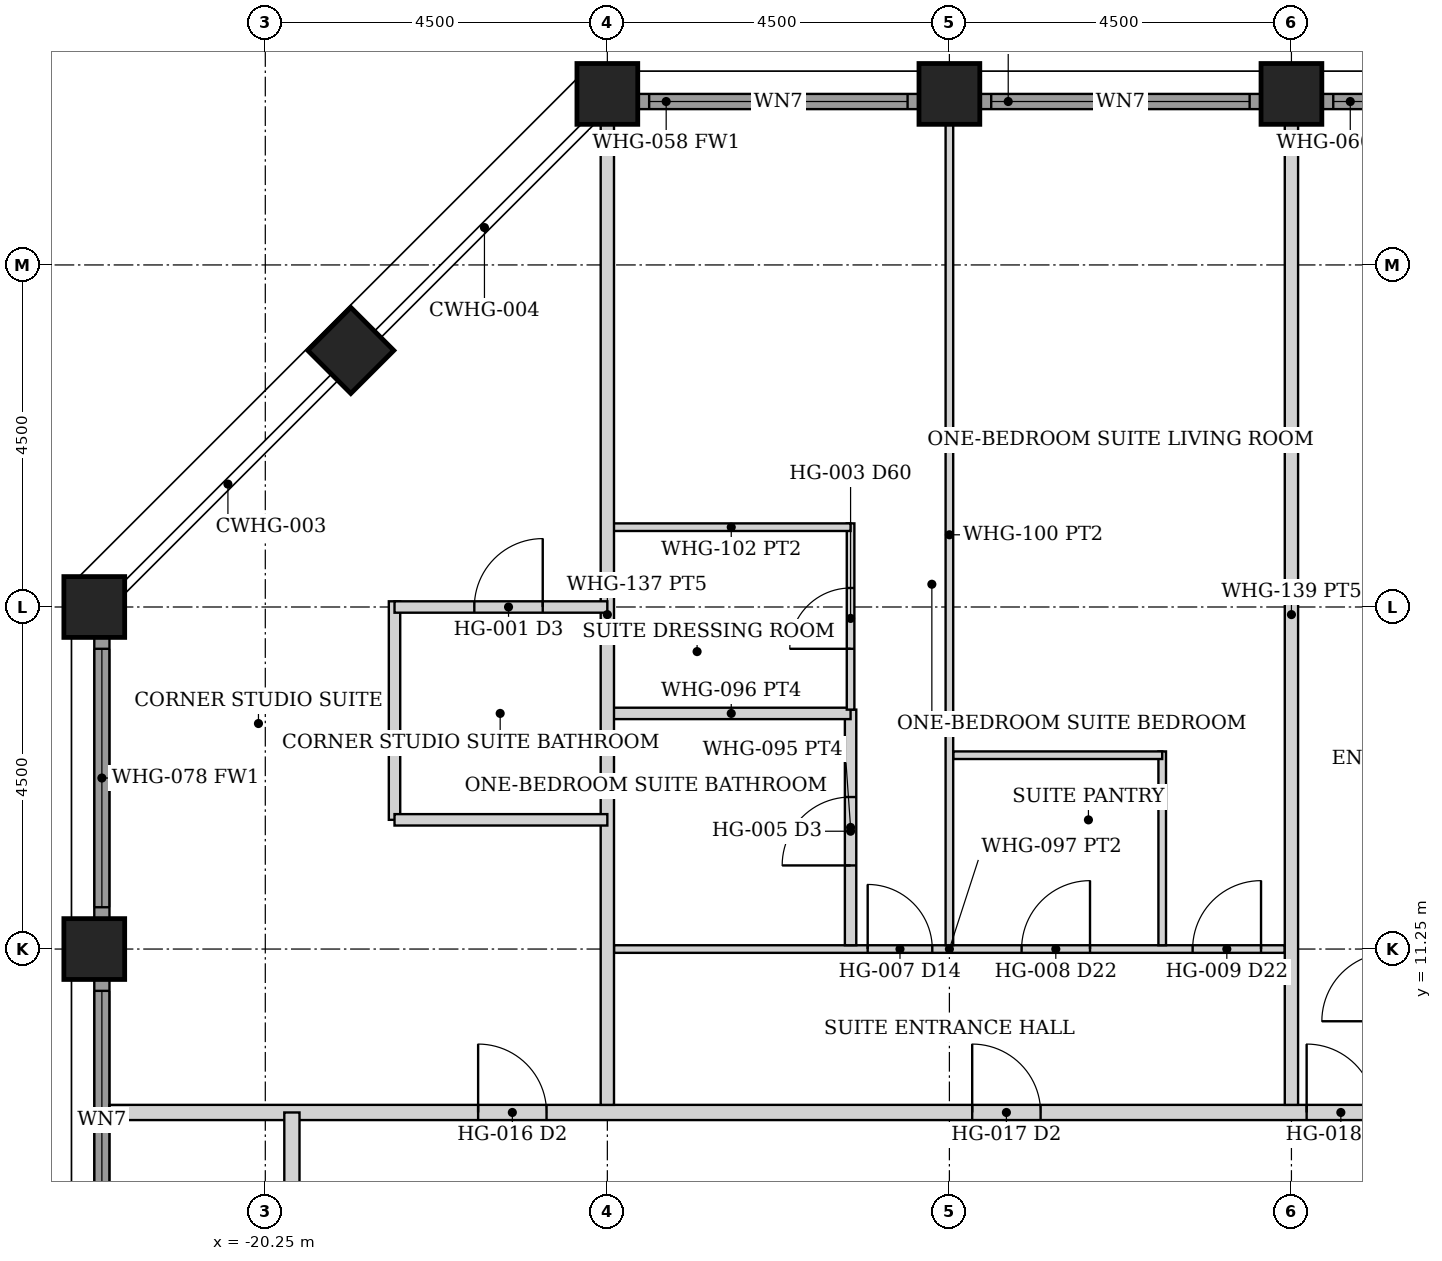
"""IFC4 building model, lengths in metres.
Left out: names, types, materials, properties, quantities, classifications, styles, units other than length and angle.
Written with IfcOpenShell. Run it as: python <this file> out.ifc"""

import sys

from ifc_helpers import new_model, si_unit, direction, frame, frame_2d, origin, origin_2d, place, context, subcontext, project, spatial, rectangle, hollow_rectangle, extrude, element, fill, save


model = new_model("IFC4")
c1 = context("Model", 3, precision=1e-05, world=origin(), true_north=direction((0.0, 1.0)))
c2 = subcontext(c1, "Body", "Model", "MODEL_VIEW")
j1 = project(units=[si_unit("LENGTHUNIT", "METRE"), si_unit("PLANEANGLEUNIT", "RADIAN")], contexts=[c1])
p1 = place(None, origin())
s1 = spatial("IfcSite", under=j1, at=p1, CompositionType="ELEMENT")
p2 = place(p1, origin())
s2 = spatial("IfcBuilding", under=s1, at=p2, CompositionType="ELEMENT")
p3 = place(p2, frame((0.0, 0.0, 186.8)))
s3 = spatial("IfcBuildingStorey", under=s2, at=p3, CompositionType="ELEMENT", Elevation=186.8)
for number, where, z_axis, x_axis in (
    (1, (-15.75, 22.5, 0.0), (0.0, 0.0, 1.0), (0.0, 1.0, 0.0)),
    (2, (-11.25, 22.5, 0.0), (0.0, 0.0, 1.0), (0.0, 1.0, 0.0)),
    (3, (-6.75, 22.5, 0.0), (0.0, 0.0, 1.0), (0.0, 1.0, 0.0)),
    (4, (-22.5, 11.25, 0.0), (0.0, 0.0, 1.0), (1.0, 0.0, 0.0)),
    (5, (-22.5, 15.75, 0.0), (0.0, 0.0, 1.0), (1.0, 0.0, 0.0)),
    (6, (-19.125, 19.125, 0.0), (0.0, 0.0, 1.0), (0.707, -0.707, 0.0)),
):
    element("IfcColumn", number, at=place(p3, frame(where, z_axis=z_axis, x_axis=x_axis)), inside=s3, PredefinedType="COLUMN", context=c2, shape_type="SweptSolid", body=[
        extrude(hollow_rectangle(XDim=0.8, YDim=0.8, WallThickness=0.045, at=origin_2d()), origin(), (0.0, 0.0, 1.0), 3.6),
    ])
p4 = place(p3, frame((-15.345, 22.4, 0.0), z_axis=(0.0, 0.0, 1.0), x_axis=(1.0, 0.0, 0.0)))
e7 = element("IfcWall", 7, at=p4, inside=s3, PredefinedType="SOLIDWALL", context=c2, shape_type="SweptSolid", body=[
    extrude(rectangle(XDim=3.69, YDim=0.2, at=frame_2d((1.845, 0.0))), origin(), (0.0, 0.0, 1.0), 2.379),
])
p5 = place(p4, frame((0.145, 0.0, 0.3)))
e8 = element("IfcOpeningElement", 8, at=p5, cuts=e7, PredefinedType="OPENING", context=c2, shape_type="SweptSolid", body=[
    extrude(rectangle(XDim=3.4, YDim=1.929, at=frame_2d((1.7, 0.964))), frame((0.0, 0.11, 0.0), z_axis=(0.0, -1.0, 0.0), x_axis=(1.0, 0.0, 0.0)), (0.0, 0.0, 1.0), 0.22),
])
p6 = place(p3, frame((-10.845, 22.4, 0.0), z_axis=(0.0, 0.0, 1.0), x_axis=(1.0, 0.0, 0.0)))
e9 = element("IfcWall", 9, at=p6, inside=s3, PredefinedType="SOLIDWALL", context=c2, shape_type="SweptSolid", body=[
    extrude(rectangle(XDim=3.69, YDim=0.2, at=frame_2d((1.845, 0.0))), origin(), (0.0, 0.0, 1.0), 2.379),
])
p7 = place(p6, frame((0.145, 0.0, 0.3)))
e10 = element("IfcOpeningElement", 10, at=p7, cuts=e9, PredefinedType="OPENING", context=c2, shape_type="SweptSolid", body=[
    extrude(rectangle(XDim=3.4, YDim=1.929, at=frame_2d((1.7, 0.964))), frame((0.0, 0.11, 0.0), z_axis=(0.0, -1.0, 0.0), x_axis=(1.0, 0.0, 0.0)), (0.0, 0.0, 1.0), 0.22),
])
p8 = place(p3, frame((-6.345, 22.4, 0.0), z_axis=(0.0, 0.0, 1.0), x_axis=(1.0, 0.0, 0.0)))
e11 = element("IfcWall", 11, at=p8, inside=s3, PredefinedType="SOLIDWALL", context=c2, shape_type="SweptSolid", body=[
    extrude(rectangle(XDim=3.69, YDim=0.2, at=frame_2d((1.845, 0.0))), origin(), (0.0, 0.0, 1.0), 2.379),
])
p9 = place(p8, frame((0.145, 0.0, 0.3)))
e12 = element("IfcOpeningElement", 12, at=p9, cuts=e11, PredefinedType="OPENING", context=c2, shape_type="SweptSolid", body=[
    extrude(rectangle(XDim=3.4, YDim=1.929, at=frame_2d((1.7, 0.964))), frame((0.0, 0.11, 0.0), z_axis=(0.0, -1.0, 0.0), x_axis=(1.0, 0.0, 0.0)), (0.0, 0.0, 1.0), 0.22),
])
p10 = place(p3, frame((-22.4, 7.155, 0.0), z_axis=(0.0, 0.0, 1.0), x_axis=(0.0, 1.0, 0.0)))
e13 = element("IfcWall", 13, at=p10, inside=s3, PredefinedType="SOLIDWALL", context=c2, shape_type="SweptSolid", body=[
    extrude(rectangle(XDim=3.69, YDim=0.2, at=frame_2d((1.845, 0.0))), origin(), (0.0, 0.0, 1.0), 2.379),
])
p11 = place(p10, frame((0.145, 0.0, 0.3)))
e14 = element("IfcOpeningElement", 14, at=p11, cuts=e13, PredefinedType="OPENING", context=c2, shape_type="SweptSolid", body=[
    extrude(rectangle(XDim=3.4, YDim=1.929, at=frame_2d((1.7, 0.964))), frame((0.0, 0.11, 0.0), z_axis=(0.0, -1.0, 0.0), x_axis=(1.0, 0.0, 0.0)), (0.0, 0.0, 1.0), 0.22),
])
p12 = place(p3, frame((-22.4, 11.655, 0.0), z_axis=(0.0, 0.0, 1.0), x_axis=(0.0, 1.0, 0.0)))
e15 = element("IfcWall", 15, at=p12, inside=s3, PredefinedType="SOLIDWALL", context=c2, shape_type="SweptSolid", body=[
    extrude(rectangle(XDim=3.69, YDim=0.2, at=frame_2d((1.845, 0.0))), origin(), (0.0, 0.0, 1.0), 2.379),
])
p13 = place(p12, frame((0.145, 0.0, 0.3)))
e16 = element("IfcOpeningElement", 16, at=p13, cuts=e15, PredefinedType="OPENING", context=c2, shape_type="SweptSolid", body=[
    extrude(rectangle(XDim=3.4, YDim=1.929, at=frame_2d((1.7, 0.964))), frame((0.0, 0.11, 0.0), z_axis=(0.0, -1.0, 0.0), x_axis=(1.0, 0.0, 0.0)), (0.0, 0.0, 1.0), 0.22),
])
p14 = place(p3, frame((-22.3, 9.1, 0.0), z_axis=(0.0, 0.0, 1.0), x_axis=(1.0, 0.0, 0.0)))
e17 = element("IfcWall", 17, at=p14, inside=s3, PredefinedType="PARTITIONING", context=c2, shape_type="SweptSolid", body=[
    extrude(rectangle(XDim=44.6, YDim=0.2, at=frame_2d((22.3, 0.0))), origin(), (0.0, 0.0, 1.0), 2.379),
])
p15 = place(p14, frame((11.35, 0.0, 0.0)))
e18 = element("IfcOpeningElement", 18, at=p15, cuts=e17, PredefinedType="OPENING", context=c2, shape_type="SweptSolid", body=[
    extrude(rectangle(XDim=0.9, YDim=2.1, at=frame_2d((0.45, 1.05))), frame((0.0, 0.11, 0.0), z_axis=(0.0, -1.0, 0.0), x_axis=(1.0, 0.0, 0.0)), (0.0, 0.0, 1.0), 0.22),
])
p16 = place(p14, frame((15.75, 0.0, 0.0)))
e19 = element("IfcOpeningElement", 19, at=p16, cuts=e17, PredefinedType="OPENING", context=c2, shape_type="SweptSolid", body=[
    extrude(rectangle(XDim=0.9, YDim=2.1, at=frame_2d((0.45, 1.05))), frame((0.0, 0.11, 0.0), z_axis=(0.0, -1.0, 0.0), x_axis=(1.0, 0.0, 0.0)), (0.0, 0.0, 1.0), 0.22),
])
p17 = place(p14, frame((23.45, 0.0, 0.0)))
e20 = element("IfcOpeningElement", 20, at=p17, cuts=e17, PredefinedType="OPENING", context=c2, shape_type="SweptSolid", body=[
    extrude(rectangle(XDim=0.9, YDim=2.1, at=frame_2d((0.45, 1.05))), frame((0.0, 0.11, 0.0), z_axis=(0.0, -1.0, 0.0), x_axis=(1.0, 0.0, 0.0)), (0.0, 0.0, 1.0), 0.22),
])
p18 = place(p14, frame((24.75, 0.0, 0.0)))
e21 = element("IfcOpeningElement", 21, at=p18, cuts=e17, PredefinedType="OPENING", context=c2, shape_type="SweptSolid", body=[
    extrude(rectangle(XDim=0.9, YDim=2.1, at=frame_2d((0.45, 1.05))), frame((0.0, 0.11, 0.0), z_axis=(0.0, -1.0, 0.0), x_axis=(1.0, 0.0, 0.0)), (0.0, 0.0, 1.0), 0.22),
])
p19 = place(p14, frame((29.35, 0.0, 0.0)))
e22 = element("IfcOpeningElement", 22, at=p19, cuts=e17, PredefinedType="OPENING", context=c2, shape_type="SweptSolid", body=[
    extrude(rectangle(XDim=0.9, YDim=2.1, at=frame_2d((0.45, 1.05))), frame((0.0, 0.11, 0.0), z_axis=(0.0, -1.0, 0.0), x_axis=(1.0, 0.0, 0.0)), (0.0, 0.0, 1.0), 0.22),
])
p20 = place(p14, frame((38.85, 0.0, 0.0)))
e23 = element("IfcOpeningElement", 23, at=p20, cuts=e17, PredefinedType="OPENING", context=c2, shape_type="SweptSolid", body=[
    extrude(rectangle(XDim=0.9, YDim=2.1, at=frame_2d((0.45, 1.05))), frame((0.0, 0.11, 0.0), z_axis=(0.0, -1.0, 0.0), x_axis=(1.0, 0.0, 0.0)), (0.0, 0.0, 1.0), 0.22),
])
p21 = place(p14, frame((4.85, 0.0, 0.0)))
e24 = element("IfcOpeningElement", 24, at=p21, cuts=e17, PredefinedType="OPENING", context=c2, shape_type="SweptSolid", body=[
    extrude(rectangle(XDim=0.9, YDim=2.1, at=frame_2d((0.45, 1.05))), frame((0.0, 0.11, 0.0), z_axis=(0.0, -1.0, 0.0), x_axis=(1.0, 0.0, 0.0)), (0.0, 0.0, 1.0), 0.22),
])
p22 = place(p3, frame((-19.9, -9.1, 0.0), z_axis=(0.0, 0.0, 1.0), x_axis=(0.0, 1.0, 0.0)))
e25 = element("IfcWall", 25, at=p22, inside=s3, PredefinedType="PARTITIONING", context=c2, shape_type="SweptSolid", body=[
    extrude(rectangle(XDim=18.2, YDim=0.2, at=frame_2d((9.1, 0.0))), origin(), (0.0, 0.0, 1.0), 2.379),
])
p23 = place(p22, frame((8.6, 0.0, 0.0)))
e26 = element("IfcOpeningElement", 26, at=p23, cuts=e25, PredefinedType="OPENING", context=c2, shape_type="SweptSolid", body=[
    extrude(rectangle(XDim=1.0, YDim=2.1, at=frame_2d((0.5, 1.05))), frame((0.0, 0.11, 0.0), z_axis=(0.0, -1.0, 0.0), x_axis=(1.0, 0.0, 0.0)), (0.0, 0.0, 1.0), 0.22),
])
p24 = place(p3, frame((-15.663, 11.25, 0.0), z_axis=(0.0, 0.0, 1.0), x_axis=(1.0, 0.0, 0.0)))
e27 = element("IfcWall", 27, at=p24, inside=s3, PredefinedType="PARTITIONING", context=c2, shape_type="SweptSolid", body=[
    extrude(rectangle(XDim=8.825, YDim=0.1, at=frame_2d((4.413, 0.0))), origin(), (0.0, 0.0, 1.0), 2.379),
])
p25 = place(p24, frame((5.363, 0.0, 0.0)))
e28 = element("IfcOpeningElement", 28, at=p25, cuts=e27, PredefinedType="OPENING", context=c2, shape_type="SweptSolid", body=[
    extrude(rectangle(XDim=0.9, YDim=2.1, at=frame_2d((0.45, 1.05))), frame((0.0, 0.06, 0.0), z_axis=(0.0, -1.0, 0.0), x_axis=(1.0, 0.0, 0.0)), (0.0, 0.0, 1.0), 0.12),
])
p26 = place(p24, frame((7.613, 0.0, 0.0)))
e29 = element("IfcOpeningElement", 29, at=p26, cuts=e27, PredefinedType="OPENING", context=c2, shape_type="SweptSolid", body=[
    extrude(rectangle(XDim=0.9, YDim=2.1, at=frame_2d((0.45, 1.05))), frame((0.0, 0.06, 0.0), z_axis=(0.0, -1.0, 0.0), x_axis=(1.0, 0.0, 0.0)), (0.0, 0.0, 1.0), 0.12),
])
p27 = place(p24, frame((3.337, 0.0, 0.0)))
e30 = element("IfcOpeningElement", 30, at=p27, cuts=e27, PredefinedType="OPENING", context=c2, shape_type="SweptSolid", body=[
    extrude(rectangle(XDim=0.85, YDim=2.1, at=frame_2d((0.425, 1.05))), frame((0.0, 0.06, 0.0), z_axis=(0.0, -1.0, 0.0), x_axis=(1.0, 0.0, 0.0)), (0.0, 0.0, 1.0), 0.12),
])
p28 = place(p3, frame((-8.45, 11.3, 0.0), z_axis=(0.0, 0.0, 1.0), x_axis=(0.0, 1.0, 0.0)))
e31 = element("IfcWall", 31, at=p28, inside=s3, PredefinedType="PARTITIONING", context=c2, shape_type="SweptSolid", body=[
    extrude(rectangle(XDim=2.55, YDim=0.1, at=frame_2d((1.275, 0.0))), origin(), (0.0, 0.0, 1.0), 2.379),
])
p29 = place(p3, frame((-11.2, 13.8, 0.0), z_axis=(0.0, 0.0, 1.0), x_axis=(1.0, 0.0, 0.0)))
e32 = element("IfcWall", 32, at=p29, inside=s3, PredefinedType="PARTITIONING", context=c2, shape_type="SweptSolid", body=[
    extrude(rectangle(XDim=2.75, YDim=0.1, at=frame_2d((1.375, 0.0))), origin(), (0.0, 0.0, 1.0), 2.379),
])
p30 = place(p3, frame((-11.25, 11.3, 0.0), z_axis=(0.0, 0.0, 1.0), x_axis=(0.0, 1.0, 0.0)))
e33 = element("IfcWall", 33, at=p30, inside=s3, PredefinedType="PARTITIONING", context=c2, shape_type="SweptSolid", body=[
    extrude(rectangle(XDim=10.8, YDim=0.1, at=frame_2d((5.4, 0.0))), origin(), (0.0, 0.0, 1.0), 2.379),
])
p31 = place(p3, frame((-12.55, 11.3, 0.0), z_axis=(0.0, 0.0, 1.0), x_axis=(0.0, 1.0, 0.0)))
e34 = element("IfcWall", 34, at=p31, inside=s3, PredefinedType="PARTITIONING", context=c2, shape_type="SweptSolid", body=[
    extrude(rectangle(XDim=3.1, YDim=0.15, at=frame_2d((1.55, 0.0))), origin(), (0.0, 0.0, 1.0), 2.379),
])
p32 = place(p31, frame((1.05, 0.0, 0.0)))
e35 = element("IfcOpeningElement", 35, at=p32, cuts=e34, PredefinedType="OPENING", context=c2, shape_type="SweptSolid", body=[
    extrude(rectangle(XDim=0.9, YDim=2.1, at=frame_2d((0.45, 1.05))), frame((0.0, 0.085, 0.0), z_axis=(0.0, -1.0, 0.0), x_axis=(1.0, 0.0, 0.0)), (0.0, 0.0, 1.0), 0.17),
])
p33 = place(p3, frame((-15.69, 14.35, 0.0), z_axis=(0.0, 0.0, 1.0), x_axis=(1.0, 0.0, 0.0)))
e36 = element("IfcWall", 36, at=p33, inside=s3, PredefinedType="PARTITIONING", context=c2, shape_type="SweptSolid", body=[
    extrude(rectangle(XDim=3.14, YDim=0.15, at=frame_2d((1.57, 0.0))), origin(), (0.0, 0.0, 1.0), 2.379),
])
p34 = place(p3, frame((-12.55, 14.4, 0.0), z_axis=(0.0, 0.0, 1.0), x_axis=(0.0, 1.0, 0.0)))
e37 = element("IfcWall", 37, at=p34, inside=s3, PredefinedType="PARTITIONING", context=c2, shape_type="SweptSolid", body=[
    extrude(rectangle(XDim=2.45, YDim=0.1, at=frame_2d((1.225, 0.0))), origin(), (0.0, 0.0, 1.0), 2.379),
])
p35 = place(p34, frame((0.8, 0.0, 0.0)))
e38 = element("IfcOpeningElement", 38, at=p35, cuts=e37, PredefinedType="OPENING", context=c2, shape_type="SweptSolid", body=[
    extrude(rectangle(XDim=0.8, YDim=2.1, at=frame_2d((0.4, 1.05))), frame((0.0, 0.06, 0.0), z_axis=(0.0, -1.0, 0.0), x_axis=(1.0, 0.0, 0.0)), (0.0, 0.0, 1.0), 0.12),
])
p36 = place(p3, frame((-15.69, 16.8, 0.0), z_axis=(0.0, 0.0, 1.0), x_axis=(1.0, 0.0, 0.0)))
e39 = element("IfcWall", 39, at=p36, inside=s3, PredefinedType="PARTITIONING", context=c2, shape_type="SweptSolid", body=[
    extrude(rectangle(XDim=3.14, YDim=0.1, at=frame_2d((1.57, 0.0))), origin(), (0.0, 0.0, 1.0), 2.379),
])
for number, where, z_axis, x_axis in (
    (40, (-15.75, 9.2, 0.0), (0.0, 0.0, 1.0), (0.0, 1.0, 0.0)),
    (41, (-6.75, 9.2, 0.0), (0.0, 0.0, 1.0), (0.0, 1.0, 0.0)),
):
    element("IfcWall", number, at=place(p3, frame(where, z_axis=z_axis, x_axis=x_axis)), inside=s3, PredefinedType="PARTITIONING", context=c2, shape_type="SweptSolid", body=[
        extrude(rectangle(XDim=12.9, YDim=0.175, at=frame_2d((6.45, 0.0))), origin(), (0.0, 0.0, 1.0), 2.379),
    ])
p37 = place(p3, frame((-18.55, 12.95, 0.0), z_axis=(0.0, 0.0, 1.0), x_axis=(0.0, 1.0, 0.0)))
e42 = element("IfcWall", 42, at=p37, inside=s3, PredefinedType="PARTITIONING", context=c2, shape_type="SweptSolid", body=[
    extrude(rectangle(XDim=2.875, YDim=0.15, at=frame_2d((1.438, 0.0))), origin(), (0.0, 0.0, 1.0), 2.379),
])
p38 = place(p3, frame((-18.55, 12.95, 0.0), z_axis=(0.0, 0.0, 1.0), x_axis=(1.0, 0.0, 0.0)))
e43 = element("IfcWall", 43, at=p38, inside=s3, PredefinedType="PARTITIONING", context=c2, shape_type="SweptSolid", body=[
    extrude(rectangle(XDim=2.8, YDim=0.15, at=frame_2d((1.4, 0.0))), origin(), (0.0, 0.0, 1.0), 2.379),
])
p39 = place(p3, frame((-18.55, 15.75, 0.0), z_axis=(0.0, 0.0, 1.0), x_axis=(1.0, 0.0, 0.0)))
e44 = element("IfcWall", 44, at=p39, inside=s3, PredefinedType="PARTITIONING", context=c2, shape_type="SweptSolid", body=[
    extrude(rectangle(XDim=2.8, YDim=0.15, at=frame_2d((1.4, 0.0))), origin(), (0.0, 0.0, 1.0), 2.379),
])
p40 = place(p39, frame((1.05, 0.0, 0.0)))
e45 = element("IfcOpeningElement", 45, at=p40, cuts=e44, PredefinedType="OPENING", context=c2, shape_type="SweptSolid", body=[
    extrude(rectangle(XDim=0.9, YDim=2.1, at=frame_2d((0.45, 1.05))), frame((0.0, 0.085, 0.0), z_axis=(0.0, -1.0, 0.0), x_axis=(1.0, 0.0, 0.0)), (0.0, 0.0, 1.0), 0.17),
])
p41 = place(p5, origin())
e46 = element("IfcWindow", 46, at=p41, inside=s3, PartitioningType="SINGLE_PANEL", PredefinedType="WINDOW", context=c2, shape_type="SweptSolid", body=[
    extrude(rectangle(XDim=3.4, YDim=1.929, at=frame_2d((1.7, 0.964))), frame((0.0, 0.03, 0.0), z_axis=(0.0, -1.0, 0.0), x_axis=(1.0, 0.0, 0.0)), (0.0, 0.0, 1.0), 0.06),
])
fill(e8, e46)
p42 = place(p7, origin())
e47 = element("IfcWindow", 47, at=p42, inside=s3, PartitioningType="SINGLE_PANEL", PredefinedType="WINDOW", context=c2, shape_type="SweptSolid", body=[
    extrude(rectangle(XDim=3.4, YDim=1.929, at=frame_2d((1.7, 0.964))), frame((0.0, 0.03, 0.0), z_axis=(0.0, -1.0, 0.0), x_axis=(1.0, 0.0, 0.0)), (0.0, 0.0, 1.0), 0.06),
])
fill(e10, e47)
p43 = place(p9, origin())
e48 = element("IfcWindow", 48, at=p43, inside=s3, PartitioningType="SINGLE_PANEL", PredefinedType="WINDOW", context=c2, shape_type="SweptSolid", body=[
    extrude(rectangle(XDim=3.4, YDim=1.929, at=frame_2d((1.7, 0.964))), frame((0.0, 0.03, 0.0), z_axis=(0.0, -1.0, 0.0), x_axis=(1.0, 0.0, 0.0)), (0.0, 0.0, 1.0), 0.06),
])
fill(e12, e48)
p44 = place(p11, origin())
e49 = element("IfcWindow", 49, at=p44, inside=s3, PartitioningType="SINGLE_PANEL", PredefinedType="WINDOW", context=c2, shape_type="SweptSolid", body=[
    extrude(rectangle(XDim=3.4, YDim=1.929, at=frame_2d((1.7, 0.964))), frame((0.0, 0.03, 0.0), z_axis=(0.0, -1.0, 0.0), x_axis=(1.0, 0.0, 0.0)), (0.0, 0.0, 1.0), 0.06),
])
fill(e14, e49)
p45 = place(p13, origin())
e50 = element("IfcWindow", 50, at=p45, inside=s3, PartitioningType="SINGLE_PANEL", PredefinedType="WINDOW", context=c2, shape_type="SweptSolid", body=[
    extrude(rectangle(XDim=3.4, YDim=1.929, at=frame_2d((1.7, 0.964))), frame((0.0, 0.03, 0.0), z_axis=(0.0, -1.0, 0.0), x_axis=(1.0, 0.0, 0.0)), (0.0, 0.0, 1.0), 0.06),
])
fill(e16, e50)
p46 = place(p15, origin())
e51 = element("IfcDoor", 51, at=p46, inside=s3, OperationType="SINGLE_SWING_LEFT", PredefinedType="DOOR", context=c2, shape_type="SweptSolid", body=[
    extrude(rectangle(XDim=0.9, YDim=2.1, at=frame_2d((0.45, 1.05))), frame((0.0, 0.025, 0.0), z_axis=(0.0, -1.0, 0.0), x_axis=(1.0, 0.0, 0.0)), (0.0, 0.0, 1.0), 0.05),
])
fill(e18, e51)
p47 = place(p25, origin())
e52 = element("IfcDoor", 52, at=p47, inside=s3, OperationType="SINGLE_SWING_RIGHT", PredefinedType="DOOR", context=c2, shape_type="SweptSolid", body=[
    extrude(rectangle(XDim=0.9, YDim=2.1, at=frame_2d((0.45, 1.05))), frame((0.0, 0.025, 0.0), z_axis=(0.0, -1.0, 0.0), x_axis=(1.0, 0.0, 0.0)), (0.0, 0.0, 1.0), 0.05),
])
fill(e28, e52)
p48 = place(p26, origin())
e53 = element("IfcDoor", 53, at=p48, inside=s3, OperationType="SINGLE_SWING_RIGHT", PredefinedType="DOOR", context=c2, shape_type="SweptSolid", body=[
    extrude(rectangle(XDim=0.9, YDim=2.1, at=frame_2d((0.45, 1.05))), frame((0.0, 0.025, 0.0), z_axis=(0.0, -1.0, 0.0), x_axis=(1.0, 0.0, 0.0)), (0.0, 0.0, 1.0), 0.05),
])
fill(e29, e53)
p49 = place(p27, origin())
e54 = element("IfcDoor", 54, at=p49, inside=s3, OperationType="SINGLE_SWING_LEFT", PredefinedType="DOOR", context=c2, shape_type="SweptSolid", body=[
    extrude(rectangle(XDim=0.85, YDim=2.1, at=frame_2d((0.425, 1.05))), frame((0.0, 0.025, 0.0), z_axis=(0.0, -1.0, 0.0), x_axis=(1.0, 0.0, 0.0)), (0.0, 0.0, 1.0), 0.05),
])
fill(e30, e54)
p50 = place(p32, origin())
e55 = element("IfcDoor", 55, at=p50, inside=s3, OperationType="SINGLE_SWING_LEFT", PredefinedType="DOOR", context=c2, shape_type="SweptSolid", body=[
    extrude(rectangle(XDim=0.9, YDim=2.1, at=frame_2d((0.45, 1.05))), frame((0.0, 0.025, 0.0), z_axis=(0.0, -1.0, 0.0), x_axis=(1.0, 0.0, 0.0)), (0.0, 0.0, 1.0), 0.05),
])
fill(e35, e55)
p51 = place(p35, origin())
e56 = element("IfcDoor", 56, at=p51, inside=s3, OperationType="SINGLE_SWING_LEFT", PredefinedType="DOOR", context=c2, shape_type="SweptSolid", body=[
    extrude(rectangle(XDim=0.8, YDim=2.1, at=frame_2d((0.4, 1.05))), frame((0.0, 0.025, 0.0), z_axis=(0.0, -1.0, 0.0), x_axis=(1.0, 0.0, 0.0)), (0.0, 0.0, 1.0), 0.05),
])
fill(e38, e56)
p52 = place(p16, origin())
e57 = element("IfcDoor", 57, at=p52, inside=s3, OperationType="SINGLE_SWING_LEFT", PredefinedType="DOOR", context=c2, shape_type="SweptSolid", body=[
    extrude(rectangle(XDim=0.9, YDim=2.1, at=frame_2d((0.45, 1.05))), frame((0.0, 0.025, 0.0), z_axis=(0.0, -1.0, 0.0), x_axis=(1.0, 0.0, 0.0)), (0.0, 0.0, 1.0), 0.05),
])
fill(e19, e57)
p53 = place(p21, origin())
e58 = element("IfcDoor", 58, at=p53, inside=s3, OperationType="SINGLE_SWING_LEFT", PredefinedType="DOOR", context=c2, shape_type="SweptSolid", body=[
    extrude(rectangle(XDim=0.9, YDim=2.1, at=frame_2d((0.45, 1.05))), frame((0.0, 0.025, 0.0), z_axis=(0.0, -1.0, 0.0), x_axis=(1.0, 0.0, 0.0)), (0.0, 0.0, 1.0), 0.05),
])
fill(e24, e58)
p54 = place(p40, origin())
e59 = element("IfcDoor", 59, at=p54, inside=s3, OperationType="SINGLE_SWING_RIGHT", PredefinedType="DOOR", context=c2, shape_type="SweptSolid", body=[
    extrude(rectangle(XDim=0.9, YDim=2.1, at=frame_2d((0.45, 1.05))), frame((0.0, 0.025, 0.0), z_axis=(0.0, -1.0, 0.0), x_axis=(1.0, 0.0, 0.0)), (0.0, 0.0, 1.0), 0.05),
])
fill(e45, e59)
save(model, sys.argv[1])
